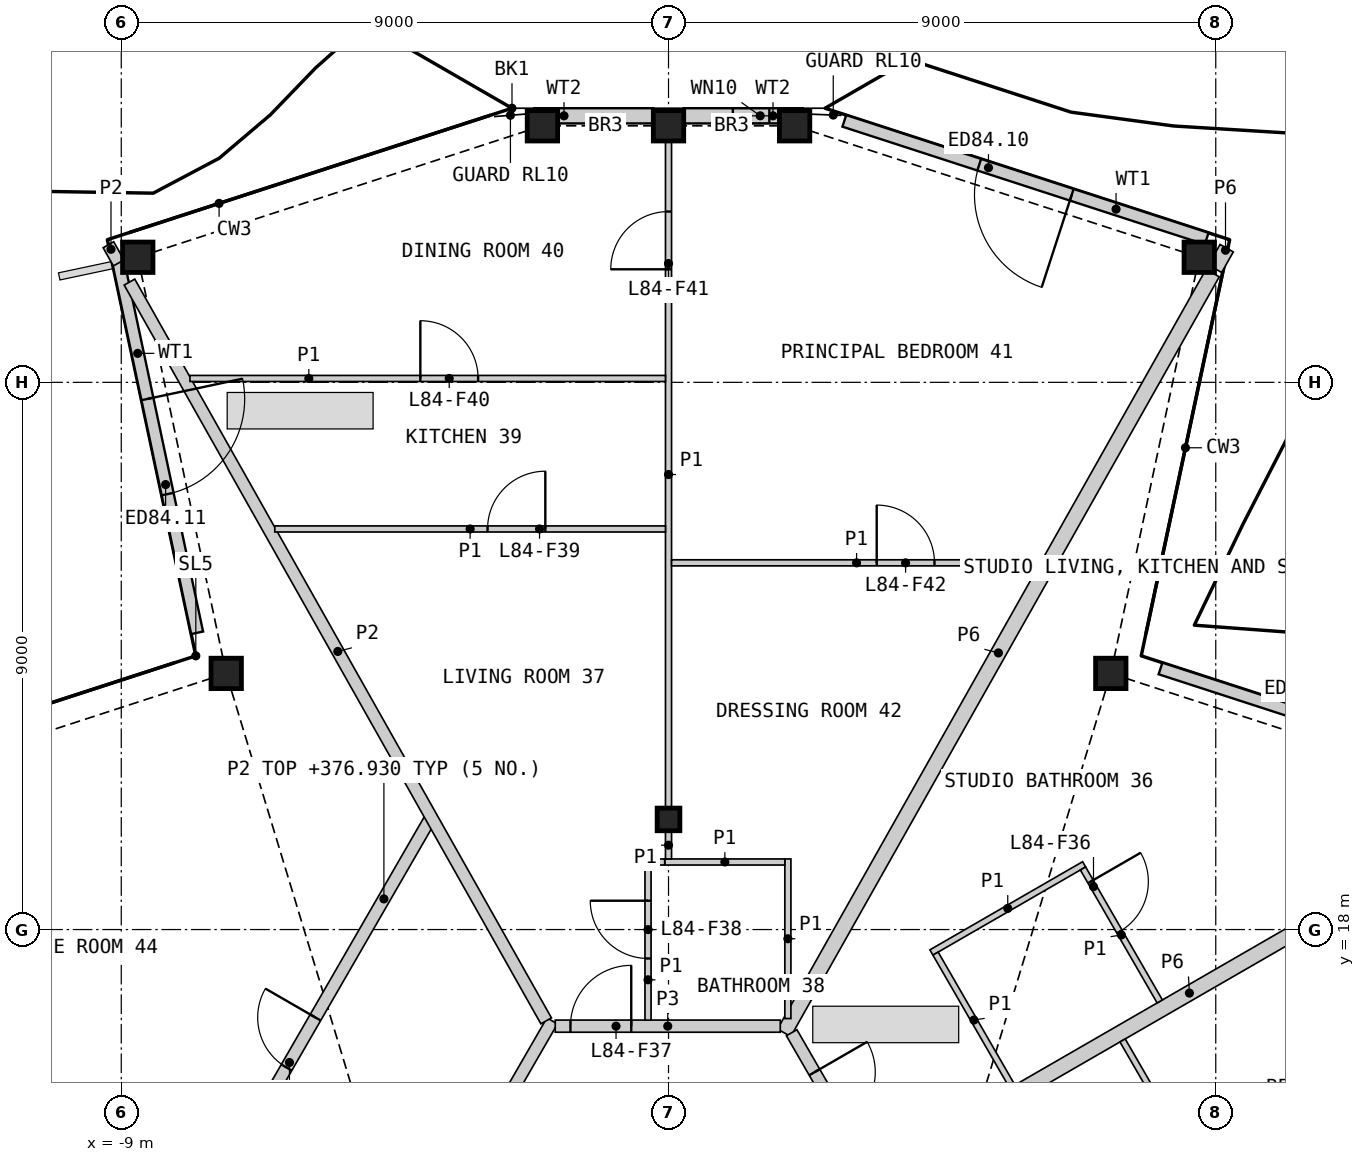
"""IFC4 building model, lengths in metres.
Left out: names, types, materials, properties, quantities, classifications, styles, units other than length and angle.
Written with IfcOpenShell. Run it as: python <this file> out.ifc"""

import sys

from ifc_helpers import new_model, si_unit, direction, frame, frame_2d, origin, origin_2d, place, context, subcontext, project, spatial, rectangle, hollow_rectangle, i_section, extrude, element, fill, save


model = new_model("IFC4")
c1 = context("Model", 3, precision=1e-05, world=origin(), true_north=direction((0.0, 1.0)))
c2 = subcontext(c1, "Body", "Model", "MODEL_VIEW")
j1 = project(units=[si_unit("LENGTHUNIT", "METRE"), si_unit("PLANEANGLEUNIT", "RADIAN")], contexts=[c1])
p1 = place(None, origin())
s1 = spatial("IfcSite", under=j1, at=p1, CompositionType="ELEMENT")
p2 = place(p1, origin())
s2 = spatial("IfcBuilding", under=s1, at=p2, CompositionType="ELEMENT")
p3 = place(p2, frame((0.0, 0.0, 374.6)))
s3 = spatial("IfcBuildingStorey", under=s2, at=p3, CompositionType="ELEMENT", Elevation=374.6)
for number, where, z_axis, x_axis in (
    (1, (7.274, 22.213, 0.0), (0.0, 0.0, 1.0), (1.0, 0.0, 0.0)),
    (2, (8.729, 29.057, 0.0), (0.0, 0.0, 1.0), (1.0, 0.0, 0.0)),
    (3, (2.074, 31.219, 0.0), (0.0, 0.0, 1.0), (1.0, 0.0, 0.0)),
    (4, (0.0, 31.219, 0.0), (0.0, 0.0, 1.0), (1.0, 0.0, 0.0)),
    (5, (-2.074, 31.219, 0.0), (0.0, 0.0, 1.0), (1.0, 0.0, 0.0)),
    (6, (-8.729, 29.057, 0.0), (0.0, 0.0, 1.0), (1.0, 0.0, 0.0)),
    (7, (-7.274, 22.213, 0.0), (0.0, 0.0, 1.0), (1.0, 0.0, 0.0)),
):
    element("IfcColumn", number, at=place(p3, frame(where, z_axis=z_axis, x_axis=x_axis)), inside=s3, PredefinedType="COLUMN", context=c2, shape_type="SweptSolid", body=[
        extrude(hollow_rectangle(XDim=0.5, YDim=0.5, WallThickness=0.03, at=origin_2d()), origin(), (0.0, 0.0, 1.0), 3.4),
    ])
p4 = place(p3, frame((0.0, 19.811, 0.0), z_axis=(0.0, 0.0, 1.0), x_axis=(1.0, 0.0, 0.0)))
e8 = element("IfcColumn", 8, at=p4, inside=s3, PredefinedType="COLUMN", context=c2, shape_type="SweptSolid", body=[
    extrude(i_section(OverallWidth=0.374, OverallDepth=0.372, WebThickness=0.016, FlangeThickness=0.026, at=origin_2d()), origin(), (0.0, 0.0, 1.0), 3.4),
])
p5 = place(p3, frame((14.05, 20.357, 0.0), z_axis=(0.0, 0.0, 1.0), x_axis=(-0.951060123915, 0.309005891041, 0.0)))
e9 = element("IfcWall", 9, at=p5, inside=s3, PredefinedType="SOLIDWALL", context=c2, shape_type="SweptSolid", body=[
    extrude(rectangle(XDim=6.265, YDim=0.2, at=frame_2d((3.133, 0.0))), origin(), (0.0, 0.0, 1.0), 2.634),
])
p6 = place(p5, frame((2.333, 0.0, 0.0)))
e10 = element("IfcOpeningElement", 10, at=p6, cuts=e9, PredefinedType="OPENING", context=c2, shape_type="SweptSolid", body=[
    extrude(rectangle(XDim=1.6, YDim=2.25, at=frame_2d((0.8, 1.125))), frame((0.0, 0.11, 0.0), z_axis=(0.0, -1.0, 0.0), x_axis=(1.0, 0.0, 0.0)), (0.0, 0.0, 1.0), 0.22),
])
p7 = place(p3, frame((8.85, 29.364, 0.0), z_axis=(0.0, 0.0, 1.0), x_axis=(-0.951048671744, 0.309041136379, 0.0)))
e11 = element("IfcWall", 11, at=p7, inside=s3, PredefinedType="SOLIDWALL", context=c2, shape_type="SweptSolid", body=[
    extrude(rectangle(XDim=6.265, YDim=0.2, at=frame_2d((3.133, 0.0))), origin(), (0.0, 0.0, 1.0), 2.634),
])
p8 = place(p7, frame((2.333, 0.0, 0.0)))
e12 = element("IfcOpeningElement", 12, at=p8, cuts=e11, PredefinedType="OPENING", context=c2, shape_type="SweptSolid", body=[
    extrude(rectangle(XDim=1.6, YDim=2.25, at=frame_2d((0.8, 1.125))), frame((0.0, 0.11, 0.0), z_axis=(0.0, -1.0, 0.0), x_axis=(1.0, 0.0, 0.0)), (0.0, 0.0, 1.0), 0.22),
])
p9 = place(p3, frame((2.208, 31.383, 0.0), z_axis=(0.0, 0.0, 1.0), x_axis=(-1.0, 0.0, 0.0)))
e13 = element("IfcWall", 13, at=p9, inside=s3, PredefinedType="SOLIDWALL", context=c2, shape_type="SweptSolid", body=[
    extrude(rectangle(XDim=1.958, YDim=0.25, at=frame_2d((0.979, 0.0))), origin(), (0.0, 0.0, 1.0), 2.634),
])
p10 = place(p9, frame((0.55, 0.0, 0.4)))
e14 = element("IfcOpeningElement", 14, at=p10, cuts=e13, PredefinedType="OPENING", context=c2, shape_type="SweptSolid", body=[
    extrude(rectangle(XDim=0.6, YDim=0.6, at=frame_2d((0.3, 0.3))), frame((0.0, 0.135, 0.0), z_axis=(0.0, -1.0, 0.0), x_axis=(1.0, 0.0, 0.0)), (0.0, 0.0, 1.0), 0.27),
])
p11 = place(p3, frame((-0.25, 31.383, 0.0), z_axis=(0.0, 0.0, 1.0), x_axis=(-1.0, 0.0, 0.0)))
e15 = element("IfcWall", 15, at=p11, inside=s3, PredefinedType="SOLIDWALL", context=c2, shape_type="SweptSolid", body=[
    extrude(rectangle(XDim=1.958, YDim=0.25, at=frame_2d((0.979, 0.0))), origin(), (0.0, 0.0, 1.0), 2.634),
])
p12 = place(p3, frame((-9.055, 29.009, 0.0), z_axis=(0.0, 0.0, 1.0), x_axis=(0.207926797195, -0.978144389652, 0.0)))
e16 = element("IfcWall", 16, at=p12, inside=s3, PredefinedType="SOLIDWALL", context=c2, shape_type="SweptSolid", body=[
    extrude(rectangle(XDim=6.265, YDim=0.2, at=frame_2d((3.133, 0.0))), origin(), (0.0, 0.0, 1.0), 2.634),
])
p13 = place(p12, frame((2.333, 0.0, 0.0)))
e17 = element("IfcOpeningElement", 17, at=p13, cuts=e16, PredefinedType="OPENING", context=c2, shape_type="SweptSolid", body=[
    extrude(rectangle(XDim=1.6, YDim=2.25, at=frame_2d((0.8, 1.125))), frame((0.0, 0.11, 0.0), z_axis=(0.0, -1.0, 0.0), x_axis=(1.0, 0.0, 0.0)), (0.0, 0.0, 1.0), 0.22),
])
p14 = place(p3, frame((1.902, 16.302, 0.0), z_axis=(0.0, 0.0, 1.0), x_axis=(0.491233789602, 0.871027763021, 0.0)))
e18 = element("IfcWall", 18, at=p14, inside=s3, PredefinedType="PARTITIONING", context=c2, shape_type="SweptSolid", body=[
    extrude(rectangle(XDim=14.345, YDim=0.25, at=frame_2d((7.173, 0.0))), origin(), (0.0, 0.0, 1.0), 2.33),
])
p15 = place(p3, frame((3.465, 14.01, 0.0), z_axis=(0.0, 0.0, 1.0), x_axis=(0.866032376801, 0.499987922186, 0.0)))
e19 = element("IfcWall", 19, at=p15, inside=s3, PredefinedType="PARTITIONING", context=c2, shape_type="SweptSolid", body=[
    extrude(rectangle(XDim=11.782, YDim=0.25, at=frame_2d((5.891, 0.0))), origin(), (0.0, 0.0, 1.0), 2.33),
])
p16 = place(p3, frame((-4.176, 12.579, 0.0), z_axis=(0.0, 0.0, 1.0), x_axis=(0.499974648164, 0.866040040179, 0.0)))
e20 = element("IfcWall", 20, at=p16, inside=s3, PredefinedType="PARTITIONING", context=c2, shape_type="SweptSolid", body=[
    extrude(rectangle(XDim=4.525, YDim=0.2, at=frame_2d((2.263, 0.0))), origin(), (0.0, 0.0, 1.0), 3.1),
])
p17 = place(p3, frame((2.025, 16.303, 0.0), z_axis=(0.0, 0.0, 1.0), x_axis=(0.500004215162, -0.866022970146, 0.0)))
e21 = element("IfcWall", 21, at=p17, inside=s3, PredefinedType="PARTITIONING", context=c2, shape_type="SweptSolid", body=[
    extrude(rectangle(XDim=4.3, YDim=0.2, at=frame_2d((2.15, 0.0))), origin(), (0.0, 0.0, 1.0), 3.1),
])
p18 = place(p17, frame((0.75, 0.0, 0.0)))
e22 = element("IfcOpeningElement", 22, at=p18, cuts=e21, PredefinedType="OPENING", context=c2, shape_type="SweptSolid", body=[
    extrude(rectangle(XDim=1.0, YDim=2.1, at=frame_2d((0.5, 1.05))), frame((0.0, 0.11, 0.0), z_axis=(0.0, -1.0, 0.0), x_axis=(1.0, 0.0, 0.0)), (0.0, 0.0, 1.0), 0.22),
])
p19 = place(p3, frame((-1.863, 16.411, 0.0), z_axis=(0.0, 0.0, 1.0), x_axis=(1.0, 0.0, 0.0)))
e23 = element("IfcWall", 23, at=p19, inside=s3, PredefinedType="PARTITIONING", context=c2, shape_type="SweptSolid", body=[
    extrude(rectangle(XDim=3.701, YDim=0.2, at=frame_2d((1.851, 0.0))), origin(), (0.0, 0.0, 1.0), 3.1),
])
p20 = place(p19, frame((0.25, 0.0, 0.0)))
e24 = element("IfcOpeningElement", 24, at=p20, cuts=e23, PredefinedType="OPENING", context=c2, shape_type="SweptSolid", body=[
    extrude(rectangle(XDim=1.0, YDim=2.1, at=frame_2d((0.5, 1.05))), frame((0.0, 0.11, 0.0), z_axis=(0.0, -1.0, 0.0), x_axis=(1.0, 0.0, 0.0)), (0.0, 0.0, 1.0), 0.22),
])
p21 = place(p3, frame((8.989, 28.868, 0.0), z_axis=(0.0, 0.0, 1.0), x_axis=(0.491394522511, 0.870937094885, 0.0)))
e25 = element("IfcWall", 25, at=p21, inside=s3, PredefinedType="PARTITIONING", context=c2, shape_type="SweptSolid", body=[
    extrude(rectangle(XDim=0.388, YDim=0.25, at=frame_2d((0.194, 0.0))), origin(), (0.0, 0.0, 1.0), 2.33),
])
p22 = place(p3, frame((-11.473, 6.74, 0.0), z_axis=(0.0, 0.0, 1.0), x_axis=(0.500001082559, 0.866024778768, 0.0)))
e26 = element("IfcWall", 26, at=p22, inside=s3, PredefinedType="PARTITIONING", context=c2, shape_type="SweptSolid", body=[
    extrude(rectangle(XDim=15.094, YDim=0.2, at=frame_2d((7.547, 0.0))), origin(), (0.0, 0.0, 1.0), 2.33),
])
p23 = place(p22, frame((10.383, 0.0, 0.0)))
e27 = element("IfcOpeningElement", 27, at=p23, cuts=e26, PredefinedType="OPENING", context=c2, shape_type="SweptSolid", body=[
    extrude(rectangle(XDim=0.95, YDim=2.1, at=frame_2d((0.475, 1.05))), frame((0.0, 0.11, 0.0), z_axis=(0.0, -1.0, 0.0), x_axis=(1.0, 0.0, 0.0)), (0.0, 0.0, 1.0), 0.22),
])
p24 = place(p3, frame((-8.865, 28.649, 0.0), z_axis=(0.0, 0.0, 1.0), x_axis=(0.491236420263, -0.871026279401, 0.0)))
e28 = element("IfcWall", 28, at=p24, inside=s3, PredefinedType="PARTITIONING", context=c2, shape_type="SweptSolid", body=[
    extrude(rectangle(XDim=13.95, YDim=0.2, at=frame_2d((6.975, 0.0))), origin(), (0.0, 0.0, 1.0), 2.33),
])
p25 = place(p3, frame((-9.211, 29.263, 0.0), z_axis=(0.0, 0.0, 1.0), x_axis=(0.4910719836, -0.871118996994, 0.0)))
e29 = element("IfcWall", 29, at=p25, inside=s3, PredefinedType="PARTITIONING", context=c2, shape_type="SweptSolid", body=[
    extrude(rectangle(XDim=0.343, YDim=0.2, at=frame_2d((0.171, 0.0))), origin(), (0.0, 0.0, 1.0), 2.33),
])
p26 = place(p3, frame((0.0, 20.008, 0.0), z_axis=(0.0, 0.0, 1.0), x_axis=(0.0, 1.0, 0.0)))
e30 = element("IfcWall", 30, at=p26, inside=s3, PredefinedType="PARTITIONING", context=c2, shape_type="SweptSolid", body=[
    extrude(rectangle(XDim=10.951, YDim=0.1, at=frame_2d((5.476, 0.0))), origin(), (0.0, 0.0, 1.0), 2.33),
])
p27 = place(p26, frame((8.851, 0.0, 0.0)))
e31 = element("IfcOpeningElement", 31, at=p27, cuts=e30, PredefinedType="OPENING", context=c2, shape_type="SweptSolid", body=[
    extrude(rectangle(XDim=0.95, YDim=2.1, at=frame_2d((0.475, 1.05))), frame((0.0, 0.06, 0.0), z_axis=(0.0, -1.0, 0.0), x_axis=(1.0, 0.0, 0.0)), (0.0, 0.0, 1.0), 0.12),
])
p28 = place(p3, frame((-7.871, 27.064, 0.0), z_axis=(0.0, 0.0, 1.0), x_axis=(1.0, 0.0, 0.0)))
e32 = element("IfcWall", 32, at=p28, inside=s3, PredefinedType="PARTITIONING", context=c2, shape_type="SweptSolid", body=[
    extrude(rectangle(XDim=7.821, YDim=0.1, at=frame_2d((3.91, 0.0))), origin(), (0.0, 0.0, 1.0), 2.33),
])
p29 = place(p28, frame((3.789, 0.0, 0.0)))
e33 = element("IfcOpeningElement", 33, at=p29, cuts=e32, PredefinedType="OPENING", context=c2, shape_type="SweptSolid", body=[
    extrude(rectangle(XDim=0.95, YDim=2.1, at=frame_2d((0.475, 1.05))), frame((0.0, 0.06, 0.0), z_axis=(0.0, -1.0, 0.0), x_axis=(1.0, 0.0, 0.0)), (0.0, 0.0, 1.0), 0.12),
])
p30 = place(p3, frame((-6.475, 24.589, 0.0), z_axis=(0.0, 0.0, 1.0), x_axis=(1.0, 0.0, 0.0)))
e34 = element("IfcWall", 34, at=p30, inside=s3, PredefinedType="PARTITIONING", context=c2, shape_type="SweptSolid", body=[
    extrude(rectangle(XDim=6.425, YDim=0.1, at=frame_2d((3.212, 0.0))), origin(), (0.0, 0.0, 1.0), 2.33),
])
p31 = place(p30, frame((3.499, 0.0, 0.0)))
e35 = element("IfcOpeningElement", 35, at=p31, cuts=e34, PredefinedType="OPENING", context=c2, shape_type="SweptSolid", body=[
    extrude(rectangle(XDim=0.95, YDim=2.1, at=frame_2d((0.475, 1.05))), frame((0.0, 0.06, 0.0), z_axis=(0.0, -1.0, 0.0), x_axis=(1.0, 0.0, 0.0)), (0.0, 0.0, 1.0), 0.12),
])
p32 = place(p3, frame((0.05, 24.031, 0.0), z_axis=(0.0, 0.0, 1.0), x_axis=(1.0, 0.0, 0.0)))
e36 = element("IfcWall", 36, at=p32, inside=s3, PredefinedType="PARTITIONING", context=c2, shape_type="SweptSolid", body=[
    extrude(rectangle(XDim=6.086, YDim=0.1, at=frame_2d((3.043, 0.0))), origin(), (0.0, 0.0, 1.0), 2.33),
])
p33 = place(p32, frame((3.374, 0.0, 0.0)))
e37 = element("IfcOpeningElement", 37, at=p33, cuts=e36, PredefinedType="OPENING", context=c2, shape_type="SweptSolid", body=[
    extrude(rectangle(XDim=0.95, YDim=2.1, at=frame_2d((0.475, 1.05))), frame((0.0, 0.06, 0.0), z_axis=(0.0, -1.0, 0.0), x_axis=(1.0, 0.0, 0.0)), (0.0, 0.0, 1.0), 0.12),
])
p34 = place(p3, frame((7.468, 16.176, 0.0), z_axis=(0.0, 0.0, 1.0), x_axis=(0.499990214365, -0.86603105345, 0.0)))
e38 = element("IfcWall", 38, at=p34, inside=s3, PredefinedType="PARTITIONING", context=c2, shape_type="SweptSolid", body=[
    extrude(rectangle(XDim=5.025, YDim=0.1, at=frame_2d((2.512, 0.0))), origin(), (0.0, 0.0, 1.0), 2.33),
])
p35 = place(p34, frame((2.293, 0.0, 0.0)))
e39 = element("IfcOpeningElement", 39, at=p35, cuts=e38, PredefinedType="OPENING", context=c2, shape_type="SweptSolid", body=[
    extrude(rectangle(XDim=0.95, YDim=2.1, at=frame_2d((0.475, 1.05))), frame((0.0, 0.06, 0.0), z_axis=(0.0, -1.0, 0.0), x_axis=(1.0, 0.0, 0.0)), (0.0, 0.0, 1.0), 0.12),
])
p36 = place(p3, frame((4.323, 17.623, 0.0), z_axis=(0.0, 0.0, 1.0), x_axis=(0.866032775405, 0.499987231761, 0.0)))
e40 = element("IfcWall", 40, at=p36, inside=s3, PredefinedType="PARTITIONING", context=c2, shape_type="SweptSolid", body=[
    extrude(rectangle(XDim=2.9, YDim=0.1, at=frame_2d((1.45, 0.0))), origin(), (0.0, 0.0, 1.0), 2.33),
])
p37 = place(p3, frame((1.963, 16.536, 0.0), z_axis=(0.0, 0.0, 1.0), x_axis=(0.0, 1.0, 0.0)))
e41 = element("IfcWall", 41, at=p37, inside=s3, PredefinedType="PARTITIONING", context=c2, shape_type="SweptSolid", body=[
    extrude(rectangle(XDim=2.625, YDim=0.1, at=frame_2d((1.312, 0.0))), origin(), (0.0, 0.0, 1.0), 2.33),
])
p38 = place(p3, frame((6.817, 19.004, 0.0), z_axis=(0.0, 0.0, 1.0), x_axis=(0.499976333282, -0.866039067339, 0.0)))
e42 = element("IfcWall", 42, at=p38, inside=s3, PredefinedType="PARTITIONING", context=c2, shape_type="SweptSolid", body=[
    extrude(rectangle(XDim=2.525, YDim=0.1, at=frame_2d((1.262, 0.0))), origin(), (0.0, 0.0, 1.0), 2.33),
])
p39 = place(p38, frame((0.25, 0.0, 0.0)))
e43 = element("IfcOpeningElement", 43, at=p39, cuts=e42, PredefinedType="OPENING", context=c2, shape_type="SweptSolid", body=[
    extrude(rectangle(XDim=0.95, YDim=2.1, at=frame_2d((0.475, 1.05))), frame((0.0, 0.06, 0.0), z_axis=(0.0, -1.0, 0.0), x_axis=(1.0, 0.0, 0.0)), (0.0, 0.0, 1.0), 0.12),
])
p40 = place(p3, frame((4.392, 17.604, 0.0), z_axis=(0.0, 0.0, 1.0), x_axis=(0.500048846702, -0.865997200291, 0.0)))
e44 = element("IfcWall", 44, at=p40, inside=s3, PredefinedType="PARTITIONING", context=c2, shape_type="SweptSolid", body=[
    extrude(rectangle(XDim=2.525, YDim=0.1, at=frame_2d((1.263, 0.0))), origin(), (0.0, 0.0, 1.0), 2.33),
])
p41 = place(p3, frame((-0.337, 16.511, 0.0), z_axis=(0.0, 0.0, 1.0), x_axis=(0.0, 1.0, 0.0)))
e45 = element("IfcWall", 45, at=p41, inside=s3, PredefinedType="PARTITIONING", context=c2, shape_type="SweptSolid", body=[
    extrude(rectangle(XDim=2.649, YDim=0.1, at=frame_2d((1.325, 0.0))), origin(), (0.0, 0.0, 1.0), 2.33),
])
p42 = place(p41, frame((1.013, 0.0, 0.0)))
e46 = element("IfcOpeningElement", 46, at=p42, cuts=e45, PredefinedType="OPENING", context=c2, shape_type="SweptSolid", body=[
    extrude(rectangle(XDim=0.95, YDim=2.1, at=frame_2d((0.475, 1.05))), frame((0.0, 0.06, 0.0), z_axis=(0.0, -1.0, 0.0), x_axis=(1.0, 0.0, 0.0)), (0.0, 0.0, 1.0), 0.12),
])
p43 = place(p3, frame((-0.06, 19.111, 0.0), z_axis=(0.0, 0.0, 1.0), x_axis=(1.0, 0.0, 0.0)))
e47 = element("IfcWall", 47, at=p43, inside=s3, PredefinedType="PARTITIONING", context=c2, shape_type="SweptSolid", body=[
    extrude(rectangle(XDim=1.973, YDim=0.1, at=frame_2d((0.987, 0.0))), origin(), (0.0, 0.0, 1.0), 2.33),
])
p44 = place(p3, frame((0.0, 19.161, 0.0), z_axis=(0.0, 0.0, 1.0), x_axis=(0.0, 1.0, 0.0)))
e48 = element("IfcWall", 48, at=p44, inside=s3, PredefinedType="PARTITIONING", context=c2, shape_type="SweptSolid", body=[
    extrude(rectangle(XDim=0.453, YDim=0.1, at=frame_2d((0.227, 0.0))), origin(), (0.0, 0.0, 1.0), 2.33),
])
p45 = place(p3, frame((-0.287, 19.11, 0.0), z_axis=(0.0, 0.0, 1.0), x_axis=(0.999994683407, 0.003260852229, 0.0)))
e49 = element("IfcWall", 49, at=p45, inside=s3, PredefinedType="PARTITIONING", context=c2, shape_type="SweptSolid", body=[
    extrude(rectangle(XDim=0.225, YDim=0.1, at=frame_2d((0.112, 0.0))), origin(), (0.0, 0.0, 1.0), 2.33),
])
p46 = place(p8, origin())
e50 = element("IfcDoor", 50, at=p46, inside=s3, OperationType="DOUBLE_DOOR_SINGLE_SWING", PredefinedType="DOOR", context=c2, shape_type="SweptSolid", body=[
    extrude(rectangle(XDim=1.6, YDim=2.25, at=frame_2d((0.8, 1.125))), frame((0.0, 0.025, 0.0), z_axis=(0.0, -1.0, 0.0), x_axis=(1.0, 0.0, 0.0)), (0.0, 0.0, 1.0), 0.05),
])
fill(e12, e50)
p47 = place(p10, origin())
e51 = element("IfcWindow", 51, at=p47, inside=s3, PartitioningType="SINGLE_PANEL", PredefinedType="WINDOW", context=c2, shape_type="SweptSolid", body=[
    extrude(rectangle(XDim=0.6, YDim=0.6, at=frame_2d((0.3, 0.3))), frame((0.0, 0.03, 0.0), z_axis=(0.0, -1.0, 0.0), x_axis=(1.0, 0.0, 0.0)), (0.0, 0.0, 1.0), 0.06),
])
fill(e14, e51)
p48 = place(p13, origin())
e52 = element("IfcDoor", 52, at=p48, inside=s3, OperationType="DOUBLE_DOOR_SINGLE_SWING", PredefinedType="DOOR", context=c2, shape_type="SweptSolid", body=[
    extrude(rectangle(XDim=1.6, YDim=2.25, at=frame_2d((0.8, 1.125))), frame((0.0, 0.025, 0.0), z_axis=(0.0, -1.0, 0.0), x_axis=(1.0, 0.0, 0.0)), (0.0, 0.0, 1.0), 0.05),
])
fill(e17, e52)
p49 = place(p18, origin())
e53 = element("IfcDoor", 53, at=p49, inside=s3, OperationType="SINGLE_SWING_LEFT", PredefinedType="DOOR", context=c2, shape_type="SweptSolid", body=[
    extrude(rectangle(XDim=1.0, YDim=2.1, at=frame_2d((0.5, 1.05))), frame((0.0, 0.025, 0.0), z_axis=(0.0, -1.0, 0.0), x_axis=(1.0, 0.0, 0.0)), (0.0, 0.0, 1.0), 0.05),
])
fill(e22, e53)
p50 = place(p39, origin())
e54 = element("IfcDoor", 54, at=p50, inside=s3, OperationType="SINGLE_SWING_LEFT", PredefinedType="DOOR", context=c2, shape_type="SweptSolid", body=[
    extrude(rectangle(XDim=0.95, YDim=2.1, at=frame_2d((0.475, 1.05))), frame((0.0, 0.025, 0.0), z_axis=(0.0, -1.0, 0.0), x_axis=(1.0, 0.0, 0.0)), (0.0, 0.0, 1.0), 0.05),
])
fill(e43, e54)
p51 = place(p20, origin())
e55 = element("IfcDoor", 55, at=p51, inside=s3, OperationType="SINGLE_SWING_RIGHT", PredefinedType="DOOR", context=c2, shape_type="SweptSolid", body=[
    extrude(rectangle(XDim=1.0, YDim=2.1, at=frame_2d((0.5, 1.05))), frame((0.0, 0.025, 0.0), z_axis=(0.0, -1.0, 0.0), x_axis=(1.0, 0.0, 0.0)), (0.0, 0.0, 1.0), 0.05),
])
fill(e24, e55)
p52 = place(p42, origin())
e56 = element("IfcDoor", 56, at=p52, inside=s3, OperationType="SINGLE_SWING_RIGHT", PredefinedType="DOOR", context=c2, shape_type="SweptSolid", body=[
    extrude(rectangle(XDim=0.95, YDim=2.1, at=frame_2d((0.475, 1.05))), frame((0.0, 0.025, 0.0), z_axis=(0.0, -1.0, 0.0), x_axis=(1.0, 0.0, 0.0)), (0.0, 0.0, 1.0), 0.05),
])
fill(e46, e56)
p53 = place(p31, origin())
e57 = element("IfcDoor", 57, at=p53, inside=s3, OperationType="SINGLE_SWING_RIGHT", PredefinedType="DOOR", context=c2, shape_type="SweptSolid", body=[
    extrude(rectangle(XDim=0.95, YDim=2.1, at=frame_2d((0.475, 1.05))), frame((0.0, 0.025, 0.0), z_axis=(0.0, -1.0, 0.0), x_axis=(1.0, 0.0, 0.0)), (0.0, 0.0, 1.0), 0.05),
])
fill(e35, e57)
p54 = place(p29, origin())
e58 = element("IfcDoor", 58, at=p54, inside=s3, OperationType="SINGLE_SWING_LEFT", PredefinedType="DOOR", context=c2, shape_type="SweptSolid", body=[
    extrude(rectangle(XDim=0.95, YDim=2.1, at=frame_2d((0.475, 1.05))), frame((0.0, 0.025, 0.0), z_axis=(0.0, -1.0, 0.0), x_axis=(1.0, 0.0, 0.0)), (0.0, 0.0, 1.0), 0.05),
])
fill(e33, e58)
p55 = place(p27, origin())
e59 = element("IfcDoor", 59, at=p55, inside=s3, OperationType="SINGLE_SWING_LEFT", PredefinedType="DOOR", context=c2, shape_type="SweptSolid", body=[
    extrude(rectangle(XDim=0.95, YDim=2.1, at=frame_2d((0.475, 1.05))), frame((0.0, 0.025, 0.0), z_axis=(0.0, -1.0, 0.0), x_axis=(1.0, 0.0, 0.0)), (0.0, 0.0, 1.0), 0.05),
])
fill(e31, e59)
p56 = place(p33, origin())
e60 = element("IfcDoor", 60, at=p56, inside=s3, OperationType="SINGLE_SWING_LEFT", PredefinedType="DOOR", context=c2, shape_type="SweptSolid", body=[
    extrude(rectangle(XDim=0.95, YDim=2.1, at=frame_2d((0.475, 1.05))), frame((0.0, 0.025, 0.0), z_axis=(0.0, -1.0, 0.0), x_axis=(1.0, 0.0, 0.0)), (0.0, 0.0, 1.0), 0.05),
])
fill(e37, e60)
p57 = place(p23, origin())
e61 = element("IfcDoor", 61, at=p57, inside=s3, OperationType="SINGLE_SWING_RIGHT", PredefinedType="DOOR", context=c2, shape_type="SweptSolid", body=[
    extrude(rectangle(XDim=0.95, YDim=2.1, at=frame_2d((0.475, 1.05))), frame((0.0, 0.025, 0.0), z_axis=(0.0, -1.0, 0.0), x_axis=(1.0, 0.0, 0.0)), (0.0, 0.0, 1.0), 0.05),
])
fill(e27, e61)
save(model, sys.argv[1])
